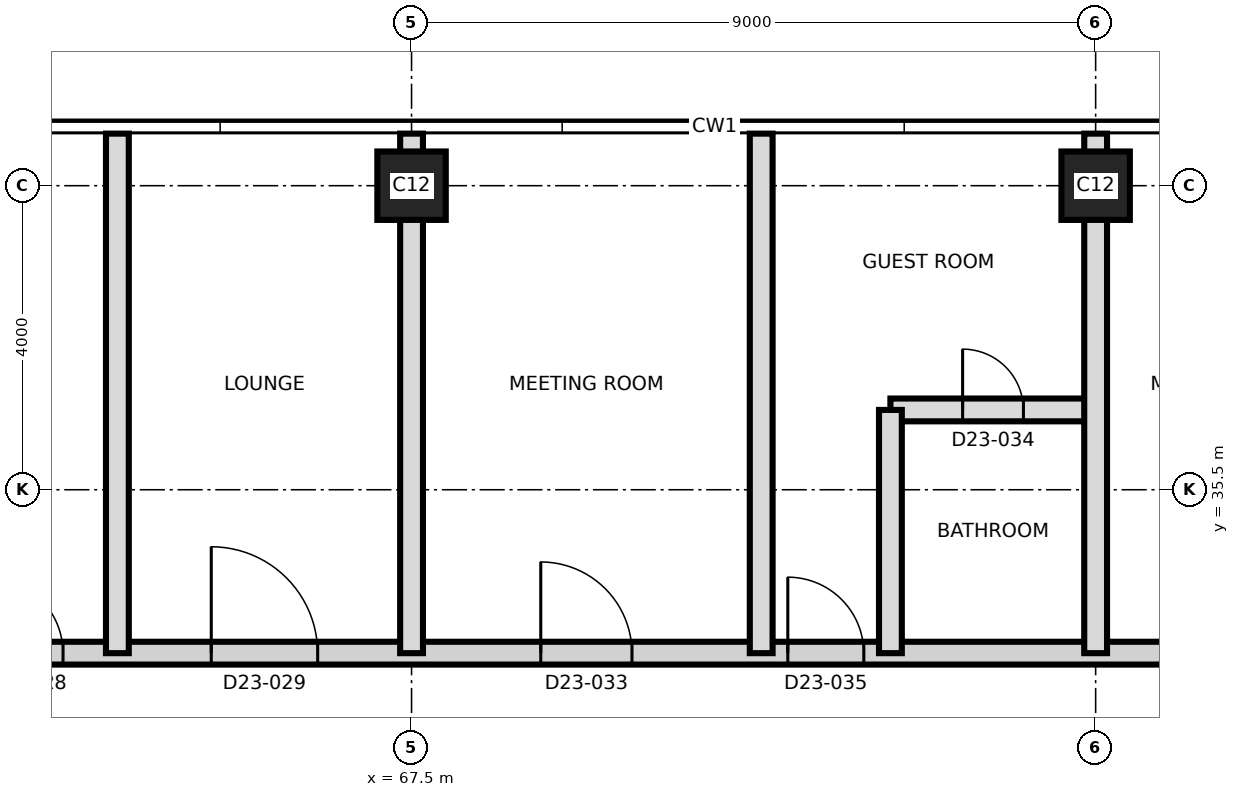
"""IFC4 building model, lengths in metres.
Left out: names, types, materials, properties, quantities, classifications, styles, units other than length and angle.
Written with IfcOpenShell. Run it as: python <this file> out.ifc"""

import sys

from ifc_helpers import new_model, si_unit, direction, frame, frame_2d, origin, origin_2d, place, context, subcontext, project, spatial, rectangle, extrude, element, fill, save


model = new_model("IFC4")
c1 = context("Model", 3, precision=1e-05, world=origin(), true_north=direction((0.0, 1.0)))
c2 = subcontext(c1, "Body", "Model", "MODEL_VIEW")
j1 = project(units=[si_unit("LENGTHUNIT", "METRE"), si_unit("PLANEANGLEUNIT", "RADIAN")], contexts=[c1])
p1 = place(None, origin())
s1 = spatial("IfcSite", under=j1, at=p1, CompositionType="ELEMENT")
p2 = place(p1, origin())
s2 = spatial("IfcBuilding", under=s1, at=p2, CompositionType="ELEMENT")
p3 = place(p2, frame((0.0, 0.0, 210.6)))
s3 = spatial("IfcBuildingStorey", under=s2, at=p3, CompositionType="ELEMENT", Elevation=210.6)
for number, where, z_axis, x_axis in (
    (1, (67.5, 39.5, 0.0), (0.0, 0.0, 1.0), (1.0, 0.0, 0.0)),
    (2, (76.5, 39.5, 0.0), (0.0, 0.0, 1.0), (1.0, 0.0, 0.0)),
):
    element("IfcColumn", number, at=place(p3, frame(where, z_axis=z_axis, x_axis=x_axis)), inside=s3, PredefinedType="COLUMN", context=c2, shape_type="SweptSolid", body=[
        extrude(rectangle(XDim=0.9, YDim=0.9, at=origin_2d()), origin(), (0.0, 0.0, 1.0), 3.7),
    ])
p4 = place(p3, frame((58.55, 33.35, 0.0), z_axis=(0.0, 0.0, 1.0), x_axis=(1.0, 0.0, 0.0)))
e3 = element("IfcWall", 3, at=p4, inside=s3, PredefinedType="PARTITIONING", context=c2, shape_type="SweptSolid", body=[
    extrude(rectangle(XDim=26.78, YDim=0.3, at=frame_2d((13.39, 0.0))), origin(), (0.0, 0.0, 1.0), 3.4),
])
p5 = place(p4, frame((3.365, 0.0, 0.0)))
e4 = element("IfcOpeningElement", 4, at=p5, cuts=e3, PredefinedType="OPENING", context=c2, shape_type="SweptSolid", body=[
    extrude(rectangle(XDim=1.0, YDim=2.1, at=frame_2d((0.5, 1.05))), frame((0.0, 0.16, 0.0), z_axis=(0.0, -1.0, 0.0), x_axis=(1.0, 0.0, 0.0)), (0.0, 0.0, 1.0), 0.32),
])
p6 = place(p4, frame((6.315, 0.0, 0.0)))
e5 = element("IfcOpeningElement", 5, at=p6, cuts=e3, PredefinedType="OPENING", context=c2, shape_type="SweptSolid", body=[
    extrude(rectangle(XDim=1.4, YDim=2.1, at=frame_2d((0.7, 1.05))), frame((0.0, 0.16, 0.0), z_axis=(0.0, -1.0, 0.0), x_axis=(1.0, 0.0, 0.0)), (0.0, 0.0, 1.0), 0.32),
])
p7 = place(p4, frame((10.65, 0.0, 0.0)))
e6 = element("IfcOpeningElement", 6, at=p7, cuts=e3, PredefinedType="OPENING", context=c2, shape_type="SweptSolid", body=[
    extrude(rectangle(XDim=1.2, YDim=2.1, at=frame_2d((0.6, 1.05))), frame((0.0, 0.16, 0.0), z_axis=(0.0, -1.0, 0.0), x_axis=(1.0, 0.0, 0.0)), (0.0, 0.0, 1.0), 0.32),
])
p8 = place(p4, frame((13.9, 0.0, 0.0)))
e7 = element("IfcOpeningElement", 7, at=p8, cuts=e3, PredefinedType="OPENING", context=c2, shape_type="SweptSolid", body=[
    extrude(rectangle(XDim=1.0, YDim=2.1, at=frame_2d((0.5, 1.05))), frame((0.0, 0.16, 0.0), z_axis=(0.0, -1.0, 0.0), x_axis=(1.0, 0.0, 0.0)), (0.0, 0.0, 1.0), 0.32),
])
p9 = place(p4, frame((19.085, 0.0, 0.0)))
e8 = element("IfcOpeningElement", 8, at=p9, cuts=e3, PredefinedType="OPENING", context=c2, shape_type="SweptSolid", body=[
    extrude(rectangle(XDim=1.2, YDim=2.1, at=frame_2d((0.6, 1.05))), frame((0.0, 0.16, 0.0), z_axis=(0.0, -1.0, 0.0), x_axis=(1.0, 0.0, 0.0)), (0.0, 0.0, 1.0), 0.32),
])
p10 = place(p4, frame((22.335, 0.0, 0.0)))
e9 = element("IfcOpeningElement", 9, at=p10, cuts=e3, PredefinedType="OPENING", context=c2, shape_type="SweptSolid", body=[
    extrude(rectangle(XDim=1.0, YDim=2.1, at=frame_2d((0.5, 1.05))), frame((0.0, 0.16, 0.0), z_axis=(0.0, -1.0, 0.0), x_axis=(1.0, 0.0, 0.0)), (0.0, 0.0, 1.0), 0.32),
])
p11 = place(p3, frame((73.8, 36.55, 0.0), z_axis=(0.0, 0.0, 1.0), x_axis=(1.0, 0.0, 0.0)))
e10 = element("IfcWall", 10, at=p11, inside=s3, PredefinedType="PARTITIONING", context=c2, shape_type="SweptSolid", body=[
    extrude(rectangle(XDim=2.7, YDim=0.3, at=frame_2d((1.35, 0.0))), origin(), (0.0, 0.0, 1.0), 3.4),
])
p12 = place(p11, frame((0.95, 0.0, 0.0)))
e11 = element("IfcOpeningElement", 11, at=p12, cuts=e10, PredefinedType="OPENING", context=c2, shape_type="SweptSolid", body=[
    extrude(rectangle(XDim=0.8, YDim=2.1, at=frame_2d((0.4, 1.05))), frame((0.0, 0.16, 0.0), z_axis=(0.0, -1.0, 0.0), x_axis=(1.0, 0.0, 0.0)), (0.0, 0.0, 1.0), 0.32),
])
for number, where, z_axis, x_axis in (
    (12, (63.63, 33.35, 0.0), (0.0, 0.0, 1.0), (0.0, 1.0, 0.0)),
    (13, (67.5, 33.35, 0.0), (0.0, 0.0, 1.0), (0.0, 1.0, 0.0)),
    (14, (72.1, 33.35, 0.0), (0.0, 0.0, 1.0), (0.0, 1.0, 0.0)),
):
    element("IfcWall", number, at=place(p3, frame(where, z_axis=z_axis, x_axis=x_axis)), inside=s3, PredefinedType="PARTITIONING", context=c2, shape_type="SweptSolid", body=[
        extrude(rectangle(XDim=6.835, YDim=0.3, at=frame_2d((3.417, 0.0))), origin(), (0.0, 0.0, 1.0), 3.35),
    ])
p13 = place(p3, frame((73.8, 33.35, 0.0), z_axis=(0.0, 0.0, 1.0), x_axis=(0.0, 1.0, 0.0)))
e15 = element("IfcWall", 15, at=p13, inside=s3, PredefinedType="PARTITIONING", context=c2, shape_type="SweptSolid", body=[
    extrude(rectangle(XDim=3.2, YDim=0.3, at=frame_2d((1.6, 0.0))), origin(), (0.0, 0.0, 1.0), 3.4),
])
p14 = place(p3, frame((76.5, 33.35, 0.0), z_axis=(0.0, 0.0, 1.0), x_axis=(0.0, 1.0, 0.0)))
e16 = element("IfcWall", 16, at=p14, inside=s3, PredefinedType="PARTITIONING", context=c2, shape_type="SweptSolid", body=[
    extrude(rectangle(XDim=6.835, YDim=0.3, at=frame_2d((3.417, 0.0))), origin(), (0.0, 0.0, 1.0), 3.35),
])
p15 = place(p5, origin())
e17 = element("IfcDoor", 17, at=p15, inside=s3, OperationType="SINGLE_SWING_LEFT", PredefinedType="DOOR", context=c2, shape_type="SweptSolid", body=[
    extrude(rectangle(XDim=1.0, YDim=2.1, at=frame_2d((0.5, 1.05))), frame((0.0, 0.025, 0.0), z_axis=(0.0, -1.0, 0.0), x_axis=(1.0, 0.0, 0.0)), (0.0, 0.0, 1.0), 0.05),
])
fill(e4, e17)
p16 = place(p6, origin())
e18 = element("IfcDoor", 18, at=p16, inside=s3, OperationType="SINGLE_SWING_RIGHT", PredefinedType="DOOR", context=c2, shape_type="SweptSolid", body=[
    extrude(rectangle(XDim=1.4, YDim=2.1, at=frame_2d((0.7, 1.05))), frame((0.0, 0.025, 0.0), z_axis=(0.0, -1.0, 0.0), x_axis=(1.0, 0.0, 0.0)), (0.0, 0.0, 1.0), 0.05),
])
fill(e5, e18)
p17 = place(p7, origin())
e19 = element("IfcDoor", 19, at=p17, inside=s3, OperationType="SINGLE_SWING_LEFT", PredefinedType="DOOR", context=c2, shape_type="SweptSolid", body=[
    extrude(rectangle(XDim=1.2, YDim=2.1, at=frame_2d((0.6, 1.05))), frame((0.0, 0.025, 0.0), z_axis=(0.0, -1.0, 0.0), x_axis=(1.0, 0.0, 0.0)), (0.0, 0.0, 1.0), 0.05),
])
fill(e6, e19)
p18 = place(p12, origin())
e20 = element("IfcDoor", 20, at=p18, inside=s3, OperationType="SINGLE_SWING_RIGHT", PredefinedType="DOOR", context=c2, shape_type="SweptSolid", body=[
    extrude(rectangle(XDim=0.8, YDim=2.1, at=frame_2d((0.4, 1.05))), frame((0.0, 0.025, 0.0), z_axis=(0.0, -1.0, 0.0), x_axis=(1.0, 0.0, 0.0)), (0.0, 0.0, 1.0), 0.05),
])
fill(e11, e20)
p19 = place(p8, origin())
e21 = element("IfcDoor", 21, at=p19, inside=s3, OperationType="SINGLE_SWING_LEFT", PredefinedType="DOOR", context=c2, shape_type="SweptSolid", body=[
    extrude(rectangle(XDim=1.0, YDim=2.1, at=frame_2d((0.5, 1.05))), frame((0.0, 0.025, 0.0), z_axis=(0.0, -1.0, 0.0), x_axis=(1.0, 0.0, 0.0)), (0.0, 0.0, 1.0), 0.05),
])
fill(e7, e21)
save(model, sys.argv[1])
